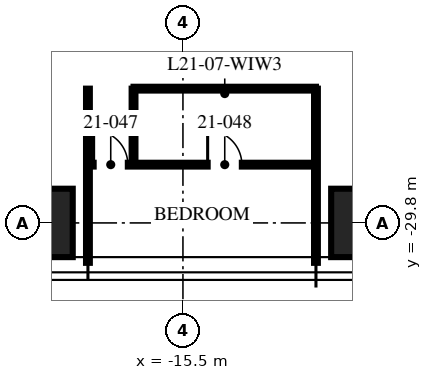
"""IFC4 building model, lengths in metres.
Left out: names, types, materials, properties, quantities, classifications, styles, units other than length and angle.
Written with IfcOpenShell. Run it as: python <this file> out.ifc"""

import sys

from ifc_helpers import new_model, si_unit, direction, frame, frame_2d, origin, origin_2d, place, context, subcontext, project, spatial, rectangle, hollow_rectangle, extrude, element, fill, save


model = new_model("IFC4")
c1 = context("Model", 3, precision=1e-05, world=origin(), true_north=direction((0.0, 1.0)))
c2 = subcontext(c1, "Body", "Model", "MODEL_VIEW")
j1 = project(units=[si_unit("LENGTHUNIT", "METRE"), si_unit("PLANEANGLEUNIT", "RADIAN")], contexts=[c1])
p1 = place(None, origin())
s1 = spatial("IfcSite", under=j1, at=p1, CompositionType="ELEMENT")
p2 = place(p1, origin())
s2 = spatial("IfcBuilding", under=s1, at=p2, CompositionType="ELEMENT")
p3 = place(p2, frame((0.0, 0.0, 84.75)))
s3 = spatial("IfcBuildingStorey", under=s2, at=p3, CompositionType="ELEMENT", Elevation=84.75)
for number, where, z_axis, x_axis in (
    (1, (-10.0, -29.8, 0.0), (0.0, 0.0, 1.0), (1.0, 0.0, 0.0)),
    (2, (-20.0, -29.8, 0.0), (0.0, 0.0, 1.0), (1.0, 0.0, 0.0)),
):
    element("IfcColumn", number, at=place(p3, frame(where, z_axis=z_axis, x_axis=x_axis)), inside=s3, PredefinedType="COLUMN", context=c2, shape_type="SweptSolid", body=[
        extrude(hollow_rectangle(XDim=3.2, YDim=1.8, WallThickness=0.2, at=origin_2d()), origin(), (0.0, 0.0, 1.0), 3.75),
    ])
for number, where, z_axis, x_axis in (
    (3, (-18.0, -26.267, 0.0), (0.0, 0.0, 1.0), (0.0, -1.0, 0.0)),
    (4, (-12.0, -26.267, 0.0), (0.0, 0.0, 1.0), (0.0, -1.0, 0.0)),
):
    element("IfcWall", number, at=place(p3, frame(where, z_axis=z_axis, x_axis=x_axis)), inside=s3, PredefinedType="PARTITIONING", context=c2, shape_type="SweptSolid", body=[
        extrude(rectangle(XDim=4.583, YDim=0.1, at=frame_2d((2.292, 0.0))), origin(), (0.0, 0.0, 1.0), 2.71),
    ])
p4 = place(p3, frame((-18.0, -28.267, 0.0), z_axis=(0.0, 0.0, 1.0), x_axis=(1.0, 0.0, 0.0)))
e5 = element("IfcWall", 5, at=p4, inside=s3, PredefinedType="PARTITIONING", context=c2, shape_type="SweptSolid", body=[
    extrude(rectangle(XDim=6.0, YDim=0.1, at=frame_2d((3.0, 0.0))), origin(), (0.0, 0.0, 1.0), 2.61),
])
p5 = place(p4, frame((0.15, 0.0, 0.0)))
e6 = element("IfcOpeningElement", 6, at=p5, cuts=e5, PredefinedType="OPENING", context=c2, shape_type="SweptSolid", body=[
    extrude(rectangle(XDim=0.9, YDim=2.1, at=frame_2d((0.45, 1.05))), frame((0.0, 0.06, 0.0), z_axis=(0.0, -1.0, 0.0), x_axis=(1.0, 0.0, 0.0)), (0.0, 0.0, 1.0), 0.12),
])
p6 = place(p4, frame((3.15, 0.0, 0.0)))
e7 = element("IfcOpeningElement", 7, at=p6, cuts=e5, PredefinedType="OPENING", context=c2, shape_type="SweptSolid", body=[
    extrude(rectangle(XDim=0.9, YDim=2.1, at=frame_2d((0.45, 1.05))), frame((0.0, 0.06, 0.0), z_axis=(0.0, -1.0, 0.0), x_axis=(1.0, 0.0, 0.0)), (0.0, 0.0, 1.0), 0.12),
])
p7 = place(p3, frame((-16.8, -26.267, 0.0), z_axis=(0.0, 0.0, 1.0), x_axis=(0.0, -1.0, 0.0)))
e8 = element("IfcWall", 8, at=p7, inside=s3, PredefinedType="PARTITIONING", context=c2, shape_type="SweptSolid", body=[
    extrude(rectangle(XDim=2.0, YDim=0.1, at=frame_2d((1.0, 0.0))), origin(), (0.0, 0.0, 1.0), 3.5),
])
p8 = place(p3, frame((-16.8, -26.267, 0.0), z_axis=(0.0, 0.0, 1.0), x_axis=(1.0, 0.0, 0.0)))
e9 = element("IfcWall", 9, at=p8, inside=s3, PredefinedType="PARTITIONING", context=c2, shape_type="SweptSolid", body=[
    extrude(rectangle(XDim=4.8, YDim=0.1, at=frame_2d((2.4, 0.0))), origin(), (0.0, 0.0, 1.0), 2.61),
])
p9 = place(p5, origin())
e10 = element("IfcDoor", 10, at=p9, inside=s3, OperationType="SINGLE_SWING_LEFT", PredefinedType="DOOR", context=c2, shape_type="SweptSolid", body=[
    extrude(rectangle(XDim=0.9, YDim=2.1, at=frame_2d((0.45, 1.05))), frame((0.0, 0.025, 0.0), z_axis=(0.0, -1.0, 0.0), x_axis=(1.0, 0.0, 0.0)), (0.0, 0.0, 1.0), 0.05),
])
fill(e6, e10)
p10 = place(p6, origin())
e11 = element("IfcDoor", 11, at=p10, inside=s3, OperationType="SINGLE_SWING_LEFT", PredefinedType="DOOR", context=c2, shape_type="SweptSolid", body=[
    extrude(rectangle(XDim=0.9, YDim=2.1, at=frame_2d((0.45, 1.05))), frame((0.0, 0.025, 0.0), z_axis=(0.0, -1.0, 0.0), x_axis=(1.0, 0.0, 0.0)), (0.0, 0.0, 1.0), 0.05),
])
fill(e7, e11)
save(model, sys.argv[1])
